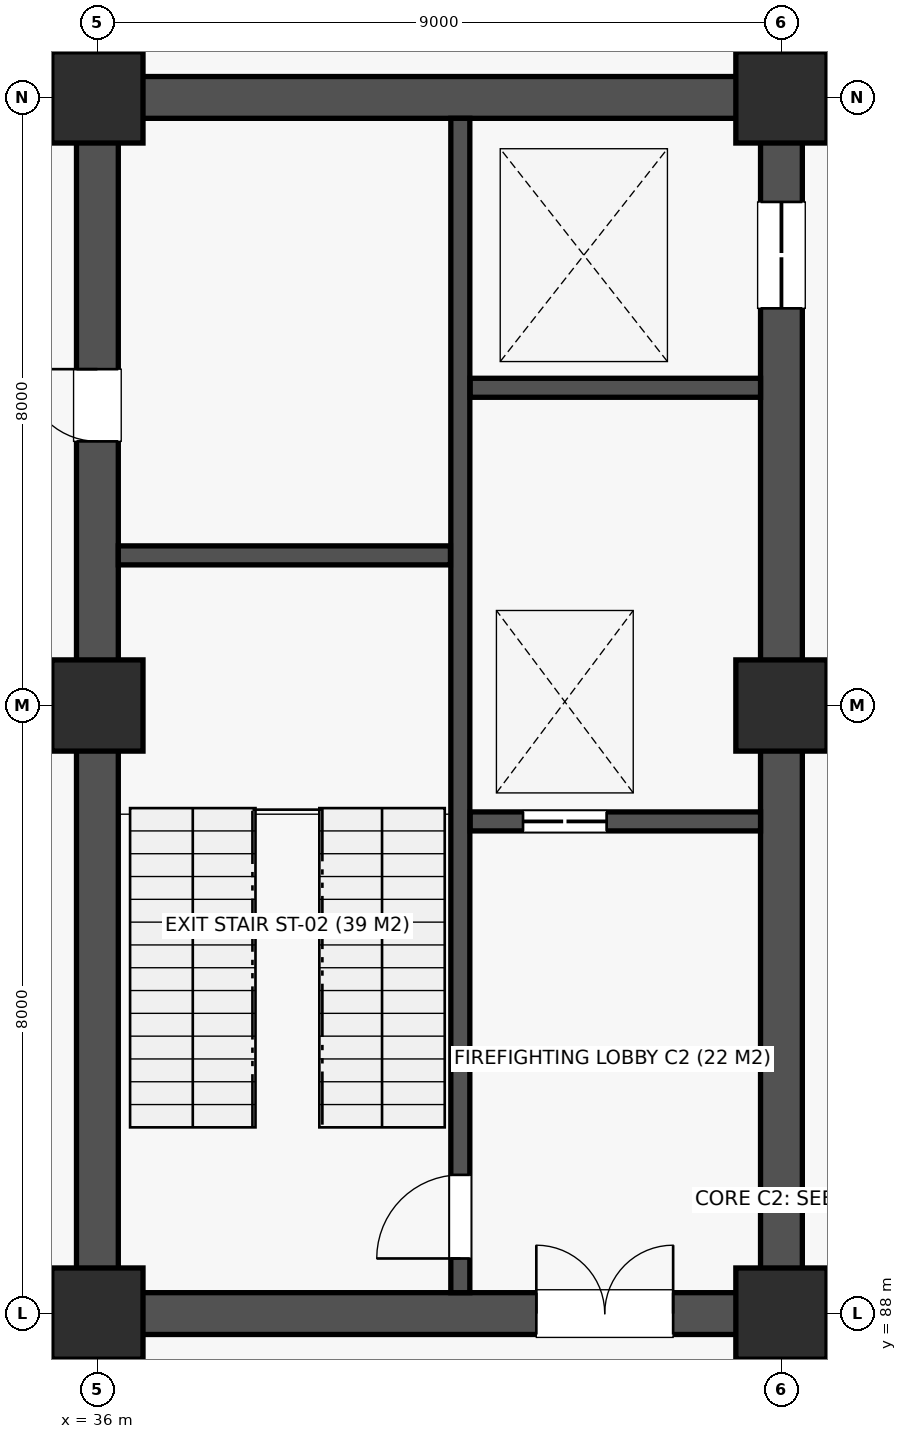
"""IFC4 building model, lengths in metres.
Left out: names, types, materials, properties, quantities, classifications, styles, units other than length and angle.
Written with IfcOpenShell. Run it as: python <this file> out.ifc"""

import sys

from ifc_helpers import new_model, si_unit, direction, frame, frame_2d, origin, origin_2d, place, context, subcontext, project, spatial, rectangle, extrude, element, fill, save


model = new_model("IFC4")
c1 = context("Model", 3, precision=1e-05, world=origin(), true_north=direction((0.0, 1.0)))
c2 = subcontext(c1, "Body", "Model", "MODEL_VIEW")
j1 = project(units=[si_unit("LENGTHUNIT", "METRE"), si_unit("PLANEANGLEUNIT", "RADIAN")], contexts=[c1])
p1 = place(None, origin())
s1 = spatial("IfcSite", under=j1, at=p1, CompositionType="ELEMENT")
p2 = place(p1, origin())
s2 = spatial("IfcBuilding", under=s1, at=p2, CompositionType="ELEMENT")
p3 = place(p2, frame((0.0, 0.0, -9.0)))
s3 = spatial("IfcBuildingStorey", under=s2, at=p3, CompositionType="ELEMENT", Elevation=-9.0)
for number, where, z_axis, x_axis in (
    (1, (36.0, 88.0, 0.0), (0.0, 0.0, 1.0), (1.0, 0.0, 0.0)),
    (2, (36.0, 96.0, 0.0), (0.0, 0.0, 1.0), (1.0, 0.0, 0.0)),
    (3, (36.0, 104.0, 0.0), (0.0, 0.0, 1.0), (1.0, 0.0, 0.0)),
    (4, (45.0, 88.0, 0.0), (0.0, 0.0, 1.0), (1.0, 0.0, 0.0)),
    (5, (45.0, 96.0, 0.0), (0.0, 0.0, 1.0), (1.0, 0.0, 0.0)),
    (6, (45.0, 104.0, 0.0), (0.0, 0.0, 1.0), (1.0, 0.0, 0.0)),
):
    element("IfcColumn", number, at=place(p3, frame(where, z_axis=z_axis, x_axis=x_axis)), inside=s3, PredefinedType="COLUMN", context=c2, shape_type="SweptSolid", body=[
        extrude(rectangle(XDim=1.2, YDim=1.2, at=origin_2d()), origin(), (0.0, 0.0, 1.0), 4.5),
    ])
p4 = place(p3, frame((36.275, 88.0, 0.0), z_axis=(0.0, 0.0, 1.0), x_axis=(1.0, 0.0, 0.0)))
e7 = element("IfcWall", 7, at=p4, inside=s3, PredefinedType="SHEAR", context=c2, shape_type="SweptSolid", body=[
    extrude(rectangle(XDim=8.45, YDim=0.55, at=frame_2d((4.225, 0.0))), origin(), (0.0, 0.0, 1.0), 4.2),
])
p5 = place(p4, frame((5.5, 0.0, 0.0)))
e8 = element("IfcOpeningElement", 8, at=p5, cuts=e7, PredefinedType="OPENING", context=c2, shape_type="SweptSolid", body=[
    extrude(rectangle(XDim=1.8, YDim=2.18, at=frame_2d((0.9, 1.09))), frame((0.0, 0.287, 0.0), z_axis=(0.0, -1.0, 0.0), x_axis=(1.0, 0.0, 0.0)), (0.0, 0.0, 1.0), 0.574),
])
p6 = place(p3, frame((36.275, 104.0, 0.0), z_axis=(0.0, 0.0, 1.0), x_axis=(1.0, 0.0, 0.0)))
e9 = element("IfcWall", 9, at=p6, inside=s3, PredefinedType="SHEAR", context=c2, shape_type="SweptSolid", body=[
    extrude(rectangle(XDim=8.45, YDim=0.55, at=frame_2d((4.225, 0.0))), origin(), (0.0, 0.0, 1.0), 4.2),
])
p7 = place(p3, frame((36.0, 88.275, 0.0), z_axis=(0.0, 0.0, 1.0), x_axis=(0.0, 1.0, 0.0)))
e10 = element("IfcWall", 10, at=p7, inside=s3, PredefinedType="SHEAR", context=c2, shape_type="SweptSolid", body=[
    extrude(rectangle(XDim=15.45, YDim=0.55, at=frame_2d((7.725, 0.0))), origin(), (0.0, 0.0, 1.0), 4.2),
])
p8 = place(p7, frame((11.2, 0.0, 0.0)))
e11 = element("IfcOpeningElement", 11, at=p8, cuts=e10, PredefinedType="OPENING", context=c2, shape_type="SweptSolid", body=[
    extrude(rectangle(XDim=0.95, YDim=2.1, at=frame_2d((0.475, 1.05))), frame((0.0, 0.287, 0.0), z_axis=(0.0, -1.0, 0.0), x_axis=(1.0, 0.0, 0.0)), (0.0, 0.0, 1.0), 0.574),
])
p9 = place(p3, frame((45.0, 88.275, 0.0), z_axis=(0.0, 0.0, 1.0), x_axis=(0.0, 1.0, 0.0)))
e12 = element("IfcWall", 12, at=p9, inside=s3, PredefinedType="SHEAR", context=c2, shape_type="SweptSolid", body=[
    extrude(rectangle(XDim=15.45, YDim=0.55, at=frame_2d((7.725, 0.0))), origin(), (0.0, 0.0, 1.0), 4.2),
])
p10 = place(p9, frame((12.95, 0.0, 0.0)))
e13 = element("IfcOpeningElement", 13, at=p10, cuts=e12, PredefinedType="OPENING", context=c2, shape_type="SweptSolid", body=[
    extrude(rectangle(XDim=1.4, YDim=2.2, at=frame_2d((0.7, 1.1))), frame((0.0, 0.287, 0.0), z_axis=(0.0, -1.0, 0.0), x_axis=(1.0, 0.0, 0.0)), (0.0, 0.0, 1.0), 0.574),
])
p11 = place(p3, frame((40.775, 88.275, 0.0), z_axis=(0.0, 0.0, 1.0), x_axis=(0.0, 1.0, 0.0)))
e14 = element("IfcWall", 14, at=p11, inside=s3, PredefinedType="SOLIDWALL", context=c2, shape_type="SweptSolid", body=[
    extrude(rectangle(XDim=15.45, YDim=0.25, at=frame_2d((7.725, 0.0))), origin(), (0.0, 0.0, 1.0), 4.2),
])
p12 = place(p11, frame((0.45, 0.0, 0.0)))
e15 = element("IfcOpeningElement", 15, at=p12, cuts=e14, PredefinedType="OPENING", context=c2, shape_type="SweptSolid", body=[
    extrude(rectangle(XDim=1.1, YDim=2.15, at=frame_2d((0.55, 1.075))), frame((0.0, 0.137, 0.0), z_axis=(0.0, -1.0, 0.0), x_axis=(1.0, 0.0, 0.0)), (0.0, 0.0, 1.0), 0.274),
])
p13 = place(p3, frame((36.275, 97.975, 0.0), z_axis=(0.0, 0.0, 1.0), x_axis=(1.0, 0.0, 0.0)))
e16 = element("IfcWall", 16, at=p13, inside=s3, PredefinedType="SOLIDWALL", context=c2, shape_type="SweptSolid", body=[
    extrude(rectangle(XDim=4.37, YDim=0.25, at=frame_2d((2.185, 0.0))), origin(), (0.0, 0.0, 1.0), 4.2),
])
p14 = place(p3, frame((40.905, 94.475, 0.0), z_axis=(0.0, 0.0, 1.0), x_axis=(1.0, 0.0, 0.0)))
e17 = element("IfcWall", 17, at=p14, inside=s3, PredefinedType="SOLIDWALL", context=c2, shape_type="SweptSolid", body=[
    extrude(rectangle(XDim=3.82, YDim=0.25, at=frame_2d((1.91, 0.0))), origin(), (0.0, 0.0, 1.0), 4.2),
])
p15 = place(p14, frame((0.695, 0.0, 0.0)))
e18 = element("IfcOpeningElement", 18, at=p15, cuts=e17, PredefinedType="OPENING", context=c2, shape_type="SweptSolid", body=[
    extrude(rectangle(XDim=1.1, YDim=2.12, at=frame_2d((0.55, 1.06))), frame((0.0, 0.137, 0.0), z_axis=(0.0, -1.0, 0.0), x_axis=(1.0, 0.0, 0.0)), (0.0, 0.0, 1.0), 0.274),
])
p16 = place(p3, frame((40.905, 100.18, 0.0), z_axis=(0.0, 0.0, 1.0), x_axis=(1.0, 0.0, 0.0)))
e19 = element("IfcWall", 19, at=p16, inside=s3, PredefinedType="SOLIDWALL", context=c2, shape_type="SweptSolid", body=[
    extrude(rectangle(XDim=3.82, YDim=0.25, at=frame_2d((1.91, 0.0))), origin(), (0.0, 0.0, 1.0), 4.2),
])
p17 = place(p5, origin())
e20 = element("IfcDoor", 20, at=p17, inside=s3, OperationType="DOUBLE_DOOR_SINGLE_SWING", PredefinedType="DOOR", context=c2, shape_type="SweptSolid", body=[
    extrude(rectangle(XDim=1.8, YDim=2.18, at=frame_2d((0.9, 1.09))), frame((0.0, 0.025, 0.0), z_axis=(0.0, -1.0, 0.0), x_axis=(1.0, 0.0, 0.0)), (0.0, 0.0, 1.0), 0.05),
])
fill(e8, e20)
p18 = place(p12, origin())
e21 = element("IfcDoor", 21, at=p18, inside=s3, OperationType="SINGLE_SWING_LEFT", PredefinedType="DOOR", context=c2, shape_type="SweptSolid", body=[
    extrude(rectangle(XDim=1.1, YDim=2.15, at=frame_2d((0.55, 1.075))), frame((0.0, 0.025, 0.0), z_axis=(0.0, -1.0, 0.0), x_axis=(1.0, 0.0, 0.0)), (0.0, 0.0, 1.0), 0.05),
])
fill(e15, e21)
p19 = place(p8, origin())
e22 = element("IfcDoor", 22, at=p19, inside=s3, OperationType="SINGLE_SWING_RIGHT", PredefinedType="DOOR", context=c2, shape_type="SweptSolid", body=[
    extrude(rectangle(XDim=0.95, YDim=2.1, at=frame_2d((0.475, 1.05))), frame((0.0, 0.025, 0.0), z_axis=(0.0, -1.0, 0.0), x_axis=(1.0, 0.0, 0.0)), (0.0, 0.0, 1.0), 0.05),
])
fill(e11, e22)
p20 = place(p15, origin())
e23 = element("IfcDoor", 23, at=p20, inside=s3, OperationType="DOUBLE_DOOR_SLIDING", PredefinedType="DOOR", context=c2, shape_type="SweptSolid", body=[
    extrude(rectangle(XDim=1.1, YDim=2.12, at=frame_2d((0.55, 1.06))), frame((0.0, 0.025, 0.0), z_axis=(0.0, -1.0, 0.0), x_axis=(1.0, 0.0, 0.0)), (0.0, 0.0, 1.0), 0.05),
])
fill(e18, e23)
p21 = place(p10, origin())
e24 = element("IfcDoor", 24, at=p21, inside=s3, OperationType="DOUBLE_DOOR_SLIDING", PredefinedType="DOOR", context=c2, shape_type="SweptSolid", body=[
    extrude(rectangle(XDim=1.4, YDim=2.2, at=frame_2d((0.7, 1.1))), frame((0.0, 0.025, 0.0), z_axis=(0.0, -1.0, 0.0), x_axis=(1.0, 0.0, 0.0)), (0.0, 0.0, 1.0), 0.05),
])
fill(e13, e24)
save(model, sys.argv[1])
